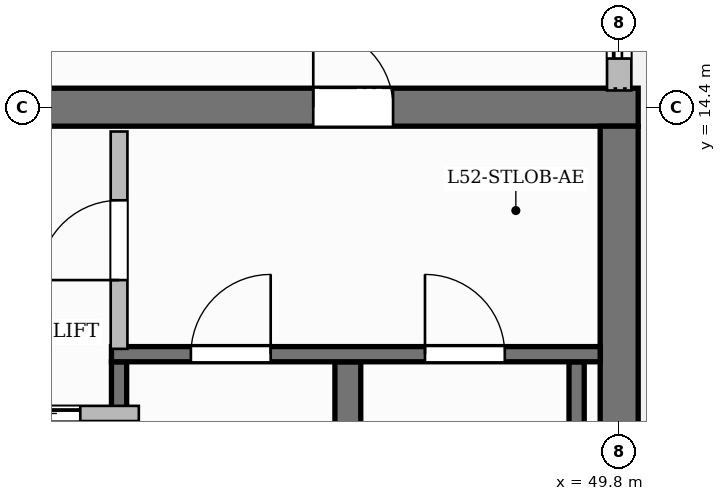
"""IFC4 building model, lengths in metres.
Left out: names, types, materials, properties, quantities, classifications, styles, units other than length and angle.
Written with IfcOpenShell. Run it as: python <this file> out.ifc"""

import sys

from ifc_helpers import new_model, si_unit, direction, frame, frame_2d, origin, place, context, subcontext, project, spatial, rectangle, extrude, source, transform, mapped, element, fill, save


model = new_model("IFC4")
c1 = context("Model", 3, precision=1e-05, world=origin(), true_north=direction((0.0, 1.0)))
c2 = subcontext(c1, "Body", "Model", "MODEL_VIEW")
j1 = project(units=[si_unit("LENGTHUNIT", "METRE"), si_unit("PLANEANGLEUNIT", "RADIAN")], contexts=[c1])
p1 = place(None, origin())
s1 = spatial("IfcSite", under=j1, at=p1, CompositionType="ELEMENT")
p2 = place(p1, origin())
s2 = spatial("IfcBuilding", under=s1, at=p2, CompositionType="ELEMENT")
p3 = place(p2, frame((0.0, 0.0, 209.6)))
s3 = spatial("IfcBuildingStorey", under=s2, at=p3, CompositionType="ELEMENT", Elevation=209.6)
p4 = place(p3, frame((34.55, 14.4, 0.0), z_axis=(0.0, 0.0, 1.0), x_axis=(1.0, 0.0, 0.0)))
e1 = element("IfcWall", 1, at=p4, inside=s3, PredefinedType="SHEAR", context=c2, shape_type="SweptSolid", body=[
    extrude(rectangle(XDim=15.5, YDim=0.5, at=frame_2d((7.75, 0.0))), origin(), (0.0, 0.0, 1.0), 3.85),
])
p5 = place(p4, frame((5.38, 0.0, 0.0)))
e2 = element("IfcOpeningElement", 2, at=p5, cuts=e1, PredefinedType="OPENING", context=c2, shape_type="SweptSolid", body=[
    extrude(rectangle(XDim=1.5, YDim=2.2, at=frame_2d((0.75, 1.1))), frame((0.0, 0.26, 0.0), z_axis=(0.0, -1.0, 0.0), x_axis=(1.0, 0.0, 0.0)), (0.0, 0.0, 1.0), 0.52),
])
p6 = place(p4, frame((1.595, 0.0, 0.0)))
e3 = element("IfcOpeningElement", 3, at=p6, cuts=e1, PredefinedType="OPENING", context=c2, shape_type="SweptSolid", body=[
    extrude(rectangle(XDim=1.05, YDim=2.15, at=frame_2d((0.525, 1.075))), frame((0.0, 0.26, 0.0), z_axis=(0.0, -1.0, 0.0), x_axis=(1.0, 0.0, 0.0)), (0.0, 0.0, 1.0), 0.52),
])
p7 = place(p4, frame((11.225, 0.0, 0.0)))
e4 = element("IfcOpeningElement", 4, at=p7, cuts=e1, PredefinedType="OPENING", context=c2, shape_type="SweptSolid", body=[
    extrude(rectangle(XDim=1.05, YDim=2.15, at=frame_2d((0.525, 1.075))), frame((0.0, 0.26, 0.0), z_axis=(0.0, -1.0, 0.0), x_axis=(1.0, 0.0, 0.0)), (0.0, 0.0, 1.0), 0.52),
])
p8 = place(p3, frame((49.8, 3.85, 0.0), z_axis=(0.0, 0.0, 1.0), x_axis=(0.0, 1.0, 0.0)))
e5 = element("IfcWall", 5, at=p8, inside=s3, PredefinedType="SHEAR", context=c2, shape_type="SweptSolid", body=[
    extrude(rectangle(XDim=10.3, YDim=0.5, at=frame_2d((5.15, 0.0))), origin(), (0.0, 0.0, 1.0), 3.85),
])
p9 = place(p3, frame((43.22, 4.1, 0.0), z_axis=(0.0, 0.0, 1.0), x_axis=(0.0, 1.0, 0.0)))
e6 = element("IfcWall", 6, at=p9, inside=s3, PredefinedType="SHEAR", context=c2, shape_type="SweptSolid", body=[
    extrude(rectangle(XDim=6.95, YDim=0.2, at=frame_2d((3.475, 0.0))), origin(), (0.0, 0.0, 1.0), 3.85),
])
p10 = place(p3, frame((46.23, 4.1, 0.0), z_axis=(0.0, 0.0, 1.0), x_axis=(0.0, 1.0, 0.0)))
e7 = element("IfcWall", 7, at=p10, inside=s3, PredefinedType="SHEAR", context=c2, shape_type="SweptSolid", body=[
    extrude(rectangle(XDim=6.95, YDim=0.34, at=frame_2d((3.475, 0.0))), origin(), (0.0, 0.0, 1.0), 3.85),
])
p11 = place(p3, frame((49.24, 4.1, 0.0), z_axis=(0.0, 0.0, 1.0), x_axis=(0.0, 1.0, 0.0)))
e8 = element("IfcWall", 8, at=p11, inside=s3, PredefinedType="SHEAR", context=c2, shape_type="SweptSolid", body=[
    extrude(rectangle(XDim=6.95, YDim=0.2, at=frame_2d((3.475, 0.0))), origin(), (0.0, 0.0, 1.0), 3.85),
])
p12 = place(p3, frame((43.12, 11.15, 0.0), z_axis=(0.0, 0.0, 1.0), x_axis=(1.0, 0.0, 0.0)))
e9 = element("IfcWall", 9, at=p12, inside=s3, PredefinedType="SHEAR", context=c2, shape_type="SweptSolid", body=[
    extrude(rectangle(XDim=6.43, YDim=0.2, at=frame_2d((3.215, 0.0))), origin(), (0.0, 0.0, 1.0), 3.85),
])
p13 = place(p12, frame((1.045, 0.0, 0.0)))
e10 = element("IfcOpeningElement", 10, at=p13, cuts=e9, PredefinedType="OPENING", context=c2, shape_type="SweptSolid", body=[
    extrude(rectangle(XDim=1.05, YDim=2.2, at=frame_2d((0.525, 1.1))), frame((0.0, 0.11, 0.0), z_axis=(0.0, -1.0, 0.0), x_axis=(1.0, 0.0, 0.0)), (0.0, 0.0, 1.0), 0.22),
])
p14 = place(p12, frame((4.125, 0.0, 0.0)))
e11 = element("IfcOpeningElement", 11, at=p14, cuts=e9, PredefinedType="OPENING", context=c2, shape_type="SweptSolid", body=[
    extrude(rectangle(XDim=1.05, YDim=2.2, at=frame_2d((0.525, 1.1))), frame((0.0, 0.11, 0.0), z_axis=(0.0, -1.0, 0.0), x_axis=(1.0, 0.0, 0.0)), (0.0, 0.0, 1.0), 0.22),
])
p15 = place(p3, frame((43.22, 11.22, 0.0), z_axis=(0.0, 0.0, 1.0), x_axis=(0.0, 1.0, 0.0)))
e12 = element("IfcWall", 12, at=p15, inside=s3, PredefinedType="PARTITIONING", context=c2, shape_type="SweptSolid", body=[
    extrude(rectangle(XDim=2.86, YDim=0.22, at=frame_2d((1.43, 0.0))), origin(), (0.0, 0.0, 1.0), 3.6),
])
p16 = place(p15, frame((0.905, 0.0, 0.0)))
e13 = element("IfcOpeningElement", 13, at=p16, cuts=e12, PredefinedType="OPENING", context=c2, shape_type="SweptSolid", body=[
    extrude(rectangle(XDim=1.05, YDim=2.15, at=frame_2d((0.525, 1.075))), frame((0.0, 0.12, 0.0), z_axis=(0.0, -1.0, 0.0), x_axis=(1.0, 0.0, 0.0)), (0.0, 0.0, 1.0), 0.24),
])
p17 = place(p3, frame((40.84, 10.37, 0.0), z_axis=(0.0, 0.0, 1.0), x_axis=(1.0, 0.0, 0.0)))
e14 = element("IfcWall", 14, at=p17, inside=s3, PredefinedType="PARTITIONING", context=c2, shape_type="SweptSolid", body=[
    extrude(rectangle(XDim=2.64, YDim=0.2, at=frame_2d((1.32, 0.0))), origin(), (0.0, 0.0, 1.0), 3.6),
])
p18 = place(p17, frame((0.77, 0.0, 0.0)))
e15 = element("IfcOpeningElement", 15, at=p18, cuts=e14, PredefinedType="OPENING", context=c2, shape_type="SweptSolid", body=[
    extrude(rectangle(XDim=1.1, YDim=2.2, at=frame_2d((0.55, 1.1))), frame((0.0, 0.11, 0.0), z_axis=(0.0, -1.0, 0.0), x_axis=(1.0, 0.0, 0.0)), (0.0, 0.0, 1.0), 0.22),
])
p19 = place(p3, frame((49.8, 14.62, 0.0), z_axis=(0.0, 0.0, 1.0), x_axis=(0.0, 1.0, 0.0)))
e16 = element("IfcWall", 16, at=p19, inside=s3, PredefinedType="SOLIDWALL", context=c2, shape_type="SweptSolid", body=[
    extrude(rectangle(XDim=6.93, YDim=0.32, at=frame_2d((3.465, 0.0))), origin(), (0.0, 0.0, 1.0), 3.085),
])
p20 = place(p19, frame((0.42, 0.0, 0.0)))
e17 = element("IfcOpeningElement", 17, at=p20, cuts=e16, PredefinedType="OPENING", context=c2, shape_type="SweptSolid", body=[
    extrude(rectangle(XDim=1.2, YDim=2.2, at=frame_2d((0.6, 1.1))), frame((0.0, 0.17, 0.0), z_axis=(0.0, -1.0, 0.0), x_axis=(1.0, 0.0, 0.0)), (0.0, 0.0, 1.0), 0.34),
])
p21 = place(p19, frame((3.659, 0.0, 0.8)))
e18 = element("IfcOpeningElement", 18, at=p21, cuts=e16, PredefinedType="OPENING", context=c2, shape_type="SweptSolid", body=[
    extrude(rectangle(XDim=1.8, YDim=1.85, at=frame_2d((0.9, 0.925))), frame((0.0, 0.17, 0.0), z_axis=(0.0, -1.0, 0.0), x_axis=(1.0, 0.0, 0.0)), (0.0, 0.0, 1.0), 0.34),
])
m1 = source(origin(), c2, "Body", "SweptSolid", [
    extrude(rectangle(XDim=1.05, YDim=2.2, at=frame_2d((0.525, 1.1))), frame((0.0, 0.025, 0.0), z_axis=(0.0, -1.0, 0.0), x_axis=(1.0, 0.0, 0.0)), (0.0, 0.0, 1.0), 0.05),
])
p22 = place(p13, origin())
e19 = element("IfcDoor", 19, at=p22, inside=s3, OperationType="SINGLE_SWING_RIGHT", PredefinedType="DOOR", context=c2, shape_type="MappedRepresentation", body=[
    mapped(m1, transform((0.0, 0.0, 0.0), scale=1.0)),
])
fill(e10, e19)
p23 = place(p14, origin())
e20 = element("IfcDoor", 20, at=p23, inside=s3, OperationType="SINGLE_SWING_LEFT", PredefinedType="DOOR", context=c2, shape_type="MappedRepresentation", body=[
    mapped(m1, transform((0.0, 0.0, 0.0), scale=1.0)),
])
fill(e11, e20)
m2 = source(origin(), c2, "Body", "SweptSolid", [
    extrude(rectangle(XDim=1.05, YDim=2.15, at=frame_2d((0.525, 1.075))), frame((0.0, 0.025, 0.0), z_axis=(0.0, -1.0, 0.0), x_axis=(1.0, 0.0, 0.0)), (0.0, 0.0, 1.0), 0.05),
])
p24 = place(p16, origin())
e21 = element("IfcDoor", 21, at=p24, inside=s3, OperationType="SINGLE_SWING_LEFT", PredefinedType="DOOR", context=c2, shape_type="MappedRepresentation", body=[
    mapped(m2, transform((0.0, 0.0, 0.0), scale=1.0)),
])
fill(e13, e21)
p25 = place(p7, origin())
e22 = element("IfcDoor", 22, at=p25, inside=s3, OperationType="SINGLE_SWING_LEFT", PredefinedType="DOOR", context=c2, shape_type="MappedRepresentation", body=[
    mapped(m2, transform((0.0, 0.0, 0.0), scale=1.0)),
])
fill(e4, e22)
m3 = source(origin(), c2, "Body", "SweptSolid", [
    extrude(rectangle(XDim=1.1, YDim=2.2, at=frame_2d((0.55, 1.1))), frame((0.0, 0.025, 0.0), z_axis=(0.0, -1.0, 0.0), x_axis=(1.0, 0.0, 0.0)), (0.0, 0.0, 1.0), 0.05),
])
p26 = place(p18, origin())
e23 = element("IfcDoor", 23, at=p26, inside=s3, OperationType="SLIDING_TO_LEFT", PredefinedType="DOOR", context=c2, shape_type="MappedRepresentation", body=[
    mapped(m3, transform((0.0, 0.0, 0.0), scale=1.0)),
])
fill(e15, e23)
m4 = source(origin(), c2, "Body", "SweptSolid", [
    extrude(rectangle(XDim=1.2, YDim=2.2, at=frame_2d((0.6, 1.1))), frame((0.0, 0.025, 0.0), z_axis=(0.0, -1.0, 0.0), x_axis=(1.0, 0.0, 0.0)), (0.0, 0.0, 1.0), 0.05),
])
p27 = place(p20, origin())
e24 = element("IfcDoor", 24, at=p27, inside=s3, OperationType="SLIDING_TO_LEFT", PredefinedType="DOOR", context=c2, shape_type="MappedRepresentation", body=[
    mapped(m4, transform((0.0, 0.0, 0.0), scale=1.0)),
])
fill(e17, e24)
save(model, sys.argv[1])
